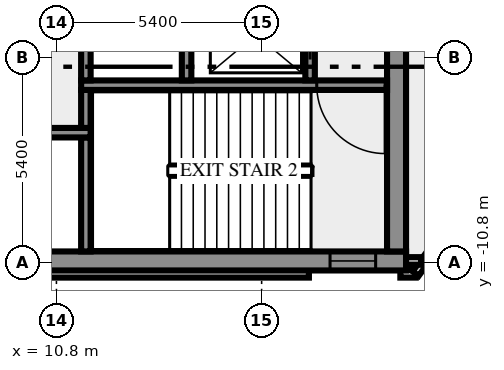
"""IFC4 building model, lengths in metres.
Left out: names, types, materials, properties, quantities, classifications, styles, units other than length and angle.
Written with IfcOpenShell. Run it as: python <this file> out.ifc"""

import sys

from ifc_helpers import new_model, si_unit, direction, frame, frame_2d, origin, place, context, subcontext, project, spatial, rectangle, extrude, element, fill, save


model = new_model("IFC4")
c1 = context("Model", 3, precision=1e-05, world=origin(), true_north=direction((0.0, 1.0)))
c2 = subcontext(c1, "Body", "Model", "MODEL_VIEW")
j1 = project(units=[si_unit("LENGTHUNIT", "METRE"), si_unit("PLANEANGLEUNIT", "RADIAN")], contexts=[c1])
p1 = place(None, origin())
s1 = spatial("IfcSite", under=j1, at=p1, CompositionType="ELEMENT")
p2 = place(p1, origin())
s2 = spatial("IfcBuilding", under=s1, at=p2, CompositionType="ELEMENT")
p3 = place(p2, frame((0.0, 0.0, 43.0)))
s3 = spatial("IfcBuildingStorey", under=s2, at=p3, CompositionType="ELEMENT", Elevation=43.0)
p4 = place(p3, frame((-17.444, -11.088, 0.0), z_axis=(0.0, 0.0, 1.0), x_axis=(1.0, 0.0, 0.0)))
e1 = element("IfcWall", 1, at=p4, inside=s3, PredefinedType="SOLIDWALL", context=c2, shape_type="SweptSolid", body=[
    extrude(rectangle(XDim=34.888, YDim=0.2, at=frame_2d((17.444, 0.0))), origin(), (0.0, 0.0, 1.0), 3.65),
])
p5 = place(p3, frame((19.85, -11.088, 0.0), z_axis=(0.0, 0.0, 1.0), x_axis=(1.0, 0.0, 0.0)))
e2 = element("IfcWall", 2, at=p5, inside=s3, PredefinedType="SOLIDWALL", context=c2, shape_type="SweptSolid", body=[
    extrude(rectangle(XDim=0.406, YDim=0.2, at=frame_2d((0.203, 0.0))), origin(), (0.0, 0.0, 1.0), 3.65),
])
p6 = place(p3, frame((20.253, -11.083, 0.0), z_axis=(0.0, 0.0, 1.0), x_axis=(0.587766567315, 0.809030569476, 0.0)))
e3 = element("IfcWall", 3, at=p6, inside=s3, PredefinedType="SOLIDWALL", context=c2, shape_type="SweptSolid", body=[
    extrude(rectangle(XDim=2.688, YDim=0.2, at=frame_2d((1.344, 0.0))), origin(), (0.0, 0.0, 1.0), 3.65),
])
p7 = place(p3, frame((19.98, -10.75, 0.0), z_axis=(0.0, 0.0, 1.0), x_axis=(1.0, 0.0, 0.0)))
e4 = element("IfcWall", 4, at=p7, inside=s3, PredefinedType="SOLIDWALL", context=c2, shape_type="SweptSolid", body=[
    extrude(rectangle(XDim=0.417, YDim=0.2, at=frame_2d((0.208, 0.0))), origin(), (0.0, 0.0, 1.0), 3.65),
])
p8 = place(p3, frame((-20.0, -10.75, 0.0), z_axis=(0.0, 0.0, 1.0), x_axis=(1.0, 0.0, 0.0)))
e5 = element("IfcWall", 5, at=p8, inside=s3, PredefinedType="SHEAR", context=c2, shape_type="SweptSolid", body=[
    extrude(rectangle(XDim=40.0, YDim=0.5, at=frame_2d((20.0, 0.0))), origin(), (0.0, 0.0, 1.0), 3.65),
])
p9 = place(p8, frame((0.8, 0.0, 1.0)))
e6 = element("IfcOpeningElement", 6, at=p9, cuts=e5, PredefinedType="OPENING", context=c2, shape_type="SweptSolid", body=[
    extrude(rectangle(XDim=1.2, YDim=1.2, at=frame_2d((0.6, 0.6))), frame((0.0, 0.26, 0.0), z_axis=(0.0, -1.0, 0.0), x_axis=(1.0, 0.0, 0.0)), (0.0, 0.0, 1.0), 0.52),
])
p10 = place(p8, frame((38.0, 0.0, 1.0)))
e7 = element("IfcOpeningElement", 7, at=p10, cuts=e5, PredefinedType="OPENING", context=c2, shape_type="SweptSolid", body=[
    extrude(rectangle(XDim=1.2, YDim=1.2, at=frame_2d((0.6, 0.6))), frame((0.0, 0.26, 0.0), z_axis=(0.0, -1.0, 0.0), x_axis=(1.0, 0.0, 0.0)), (0.0, 0.0, 1.0), 0.52),
])
p11 = place(p3, frame((11.575, -10.5, 0.0), z_axis=(0.0, 0.0, 1.0), x_axis=(0.0, 1.0, 0.0)))
e8 = element("IfcWall", 8, at=p11, inside=s3, PredefinedType="SHEAR", context=c2, shape_type="SweptSolid", body=[
    extrude(rectangle(XDim=3.0, YDim=0.25, at=frame_2d((1.5, 0.0))), origin(), (0.0, 0.0, 1.0), 3.65),
])
p12 = place(p3, frame((19.75, -10.5, 0.0), z_axis=(0.0, 0.0, 1.0), x_axis=(0.0, 1.0, 0.0)))
e9 = element("IfcWall", 9, at=p12, inside=s3, PredefinedType="SHEAR", context=c2, shape_type="SweptSolid", body=[
    extrude(rectangle(XDim=8.8, YDim=0.5, at=frame_2d((4.4, 0.0))), origin(), (0.0, 0.0, 1.0), 3.65),
])
p13 = place(p3, frame((11.7, -7.375, 0.0), z_axis=(0.0, 0.0, 1.0), x_axis=(-1.0, 0.0, 0.0)))
e10 = element("IfcWall", 10, at=p13, inside=s3, PredefinedType="SHEAR", context=c2, shape_type="SweptSolid", body=[
    extrude(rectangle(XDim=23.4, YDim=0.25, at=frame_2d((11.7, 0.0))), origin(), (0.0, 0.0, 1.0), 3.65),
])
p14 = place(p13, frame((21.45, 0.0, 0.0)))
e11 = element("IfcOpeningElement", 11, at=p14, cuts=e10, PredefinedType="OPENING", context=c2, shape_type="SweptSolid", body=[
    extrude(rectangle(XDim=1.1, YDim=2.1, at=frame_2d((0.55, 1.05))), frame((0.0, 0.135, 0.0), z_axis=(0.0, -1.0, 0.0), x_axis=(1.0, 0.0, 0.0)), (0.0, 0.0, 1.0), 0.27),
])
p15 = place(p13, frame((18.95, 0.0, 0.0)))
e12 = element("IfcOpeningElement", 12, at=p15, cuts=e10, PredefinedType="OPENING", context=c2, shape_type="SweptSolid", body=[
    extrude(rectangle(XDim=1.1, YDim=2.1, at=frame_2d((0.55, 1.05))), frame((0.0, 0.135, 0.0), z_axis=(0.0, -1.0, 0.0), x_axis=(1.0, 0.0, 0.0)), (0.0, 0.0, 1.0), 0.27),
])
p16 = place(p13, frame((16.45, 0.0, 0.0)))
e13 = element("IfcOpeningElement", 13, at=p16, cuts=e10, PredefinedType="OPENING", context=c2, shape_type="SweptSolid", body=[
    extrude(rectangle(XDim=1.1, YDim=2.1, at=frame_2d((0.55, 1.05))), frame((0.0, 0.135, 0.0), z_axis=(0.0, -1.0, 0.0), x_axis=(1.0, 0.0, 0.0)), (0.0, 0.0, 1.0), 0.27),
])
p17 = place(p13, frame((13.875, 0.0, 0.0)))
e14 = element("IfcOpeningElement", 14, at=p17, cuts=e10, PredefinedType="OPENING", context=c2, shape_type="SweptSolid", body=[
    extrude(rectangle(XDim=0.9, YDim=2.1, at=frame_2d((0.45, 1.05))), frame((0.0, 0.135, 0.0), z_axis=(0.0, -1.0, 0.0), x_axis=(1.0, 0.0, 0.0)), (0.0, 0.0, 1.0), 0.27),
])
p18 = place(p13, frame((11.1, 0.0, 0.0)))
e15 = element("IfcOpeningElement", 15, at=p18, cuts=e10, PredefinedType="OPENING", context=c2, shape_type="SweptSolid", body=[
    extrude(rectangle(XDim=0.9, YDim=2.1, at=frame_2d((0.45, 1.05))), frame((0.0, 0.135, 0.0), z_axis=(0.0, -1.0, 0.0), x_axis=(1.0, 0.0, 0.0)), (0.0, 0.0, 1.0), 0.27),
])
p19 = place(p3, frame((11.575, -7.25, 0.0), z_axis=(0.0, 0.0, 1.0), x_axis=(0.0, 1.0, 0.0)))
e16 = element("IfcWall", 16, at=p19, inside=s3, PredefinedType="SHEAR", context=c2, shape_type="SweptSolid", body=[
    extrude(rectangle(XDim=1.0, YDim=0.25, at=frame_2d((0.5, 0.0))), origin(), (0.0, 0.0, 1.0), 3.65),
])
p20 = place(p3, frame((19.5, -6.125, 0.0), z_axis=(0.0, 0.0, 1.0), x_axis=(-1.0, 0.0, 0.0)))
e17 = element("IfcWall", 17, at=p20, inside=s3, PredefinedType="SHEAR", context=c2, shape_type="SweptSolid", body=[
    extrude(rectangle(XDim=8.05, YDim=0.25, at=frame_2d((4.025, 0.0))), origin(), (0.0, 0.0, 1.0), 3.65),
])
p21 = place(p20, frame((0.05, 0.0, 0.0)))
e18 = element("IfcOpeningElement", 18, at=p21, cuts=e17, PredefinedType="OPENING", context=c2, shape_type="SweptSolid", body=[
    extrude(rectangle(XDim=1.8, YDim=2.1, at=frame_2d((0.9, 1.05))), frame((0.0, 0.135, 0.0), z_axis=(0.0, -1.0, 0.0), x_axis=(1.0, 0.0, 0.0)), (0.0, 0.0, 1.0), 0.27),
])
for number, where, z_axis, x_axis in (
    (19, (11.575, -6.0, 0.0), (0.0, 0.0, 1.0), (0.0, 1.0, 0.0)),
    (20, (14.225, -6.0, 0.0), (0.0, 0.0, 1.0), (0.0, 1.0, 0.0)),
):
    element("IfcWall", number, at=place(p3, frame(where, z_axis=z_axis, x_axis=x_axis)), inside=s3, PredefinedType="SHEAR", context=c2, shape_type="SweptSolid", body=[
        extrude(rectangle(XDim=1.75, YDim=0.25, at=frame_2d((0.875, 0.0))), origin(), (0.0, 0.0, 1.0), 3.65),
    ])
p22 = place(p3, frame((17.475, -6.0, 0.0), z_axis=(0.0, 0.0, 1.0), x_axis=(0.0, 1.0, 0.0)))
e21 = element("IfcWall", 21, at=p22, inside=s3, PredefinedType="SHEAR", context=c2, shape_type="SweptSolid", body=[
    extrude(rectangle(XDim=4.3, YDim=0.25, at=frame_2d((2.15, 0.0))), origin(), (0.0, 0.0, 1.0), 3.65),
])
p23 = place(p22, frame((0.55, 0.0, 0.0)))
e22 = element("IfcOpeningElement", 22, at=p23, cuts=e21, PredefinedType="OPENING", context=c2, shape_type="SweptSolid", body=[
    extrude(rectangle(XDim=1.3, YDim=2.1, at=frame_2d((0.65, 1.05))), frame((0.0, 0.135, 0.0), z_axis=(0.0, -1.0, 0.0), x_axis=(1.0, 0.0, 0.0)), (0.0, 0.0, 1.0), 0.27),
])
p24 = place(p10, origin())
e23 = element("IfcWindow", 23, at=p24, inside=s3, PartitioningType="SINGLE_PANEL", PredefinedType="WINDOW", context=c2, shape_type="SweptSolid", body=[
    extrude(rectangle(XDim=1.2, YDim=1.2, at=frame_2d((0.6, 0.6))), frame((0.0, 0.03, 0.0), z_axis=(0.0, -1.0, 0.0), x_axis=(1.0, 0.0, 0.0)), (0.0, 0.0, 1.0), 0.06),
])
fill(e7, e23)
p25 = place(p21, origin())
e24 = element("IfcDoor", 24, at=p25, inside=s3, OperationType="DOUBLE_DOOR_SINGLE_SWING", PredefinedType="DOOR", context=c2, shape_type="SweptSolid", body=[
    extrude(rectangle(XDim=1.8, YDim=2.1, at=frame_2d((0.9, 1.05))), frame((0.0, 0.025, 0.0), z_axis=(0.0, -1.0, 0.0), x_axis=(1.0, 0.0, 0.0)), (0.0, 0.0, 1.0), 0.05),
])
fill(e18, e24)
p26 = place(p23, origin())
e25 = element("IfcDoor", 25, at=p26, inside=s3, OperationType="DOUBLE_DOOR_SLIDING", PredefinedType="DOOR", context=c2, shape_type="SweptSolid", body=[
    extrude(rectangle(XDim=1.3, YDim=2.1, at=frame_2d((0.65, 1.05))), frame((0.0, 0.025, 0.0), z_axis=(0.0, -1.0, 0.0), x_axis=(1.0, 0.0, 0.0)), (0.0, 0.0, 1.0), 0.05),
])
fill(e22, e25)
save(model, sys.argv[1])
